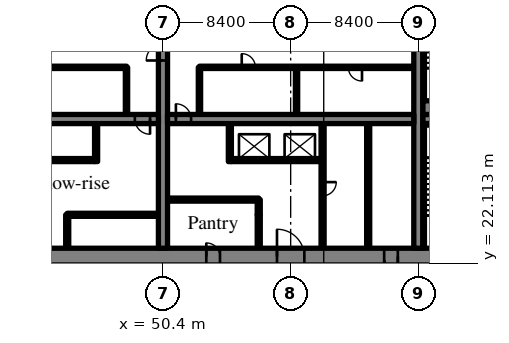
"""IFC4 building model, lengths in metres.
Left out: names, types, materials, properties, quantities, classifications, styles, units other than length and angle.
Written with IfcOpenShell. Run it as: python <this file> out.ifc"""

import sys

from ifc_helpers import new_model, si_unit, direction, frame, frame_2d, origin, place, context, subcontext, project, spatial, rectangle, extrude, source, transform, mapped, element, fill, save


model = new_model("IFC4")
c1 = context("Model", 3, precision=1e-05, world=origin(), true_north=direction((0.0, 1.0)))
c2 = subcontext(c1, "Body", "Model", "MODEL_VIEW")
j1 = project(units=[si_unit("LENGTHUNIT", "METRE"), si_unit("PLANEANGLEUNIT", "RADIAN")], contexts=[c1])
p1 = place(None, origin())
s1 = spatial("IfcSite", under=j1, at=p1, CompositionType="ELEMENT")
p2 = place(p1, origin())
s2 = spatial("IfcBuilding", under=s1, at=p2, CompositionType="ELEMENT")
p3 = place(p2, origin())
s3 = spatial("IfcBuildingStorey", under=s2, at=p3, CompositionType="ELEMENT", Elevation=0.0)
m1 = source(origin(), c2, "Body", "SweptSolid", [
    extrude(rectangle(XDim=50.4, YDim=1.1, at=frame_2d((25.2, 0.0))), origin(), (0.0, 0.0, 1.0), 5.72),
])
p4 = place(p3, frame((25.2, 22.55, 0.0), z_axis=(0.0, 0.0, 1.0), x_axis=(1.0, 0.0, 0.0)))
e1 = element("IfcWall", 1, at=p4, inside=s3, PredefinedType="SHEAR", context=c2, shape_type="MappedRepresentation", body=[
    mapped(m1, transform((0.0, 0.0, 0.0), scale=1.0)),
])
m2 = source(origin(), c2, "Body", "SweptSolid", [
    extrude(rectangle(XDim=1.8, YDim=2.1, at=frame_2d((0.9, 1.05))), frame((0.0, 0.56, 0.0), z_axis=(0.0, -1.0, 0.0), x_axis=(1.0, 0.0, 0.0)), (0.0, 0.0, 1.0), 1.12),
])
p5 = place(p4, frame((15.9, 0.0, 0.0)))
e2 = element("IfcOpeningElement", 2, at=p5, cuts=e1, PredefinedType="OPENING", context=c2, shape_type="MappedRepresentation", body=[
    mapped(m2, transform((0.0, 0.0, 0.0), scale=1.0)),
])
p6 = place(p4, frame((32.7, 0.0, 0.0)))
e3 = element("IfcOpeningElement", 3, at=p6, cuts=e1, PredefinedType="OPENING", context=c2, shape_type="MappedRepresentation", body=[
    mapped(m2, transform((0.0, 0.0, 0.0), scale=1.0)),
])
m3 = source(origin(), c2, "Body", "SweptSolid", [
    extrude(rectangle(XDim=0.9, YDim=2.1, at=frame_2d((0.45, 1.05))), frame((0.0, 0.56, 0.0), z_axis=(0.0, -1.0, 0.0), x_axis=(1.0, 0.0, 0.0)), (0.0, 0.0, 1.0), 1.12),
])
p7 = place(p4, frame((39.75, 0.0, 0.0)))
e4 = element("IfcOpeningElement", 4, at=p7, cuts=e1, PredefinedType="OPENING", context=c2, shape_type="MappedRepresentation", body=[
    mapped(m3, transform((0.0, 0.0, 0.0), scale=1.0)),
])
p8 = place(p4, frame((28.05, 0.0, 0.0)))
e5 = element("IfcOpeningElement", 5, at=p8, cuts=e1, PredefinedType="OPENING", context=c2, shape_type="MappedRepresentation", body=[
    mapped(m3, transform((0.0, 0.0, 0.0), scale=1.0)),
])
m4 = source(origin(), c2, "Body", "SweptSolid", [
    extrude(rectangle(XDim=1.2, YDim=2.1, at=frame_2d((0.6, 1.05))), frame((0.0, 0.56, 0.0), z_axis=(0.0, -1.0, 0.0), x_axis=(1.0, 0.0, 0.0)), (0.0, 0.0, 1.0), 1.12),
])
p9 = place(p4, frame((6.425, 0.0, 0.0)))
e6 = element("IfcOpeningElement", 6, at=p9, cuts=e1, PredefinedType="OPENING", context=c2, shape_type="MappedRepresentation", body=[
    mapped(m4, transform((0.0, 0.0, 0.0), scale=1.0)),
])
p10 = place(p4, frame((47.675, 0.0, 0.0)))
e7 = element("IfcOpeningElement", 7, at=p10, cuts=e1, PredefinedType="OPENING", context=c2, shape_type="MappedRepresentation", body=[
    mapped(m4, transform((0.0, 0.0, 0.0), scale=1.0)),
])
m5 = source(origin(), c2, "Body", "SweptSolid", [
    extrude(rectangle(XDim=17.8, YDim=0.6, at=frame_2d((8.9, 0.0))), origin(), (0.0, 0.0, 1.0), 5.72),
])
p11 = place(p3, frame((50.4, 23.1, 0.0), z_axis=(0.0, 0.0, 1.0), x_axis=(0.0, 1.0, 0.0)))
e8 = element("IfcWall", 8, at=p11, inside=s3, PredefinedType="SHEAR", context=c2, shape_type="MappedRepresentation", body=[
    mapped(m5, transform((0.0, 0.0, 0.0), scale=1.0)),
])
m6 = source(origin(), c2, "Body", "SweptSolid", [
    extrude(rectangle(XDim=1.1, YDim=2.1, at=frame_2d((0.55, 1.05))), frame((0.0, 0.31, 0.0), z_axis=(0.0, -1.0, 0.0), x_axis=(1.0, 0.0, 0.0)), (0.0, 0.0, 1.0), 0.62),
])
p12 = place(p11, frame((12.35, 0.0, 0.0)))
e9 = element("IfcOpeningElement", 9, at=p12, cuts=e8, PredefinedType="OPENING", context=c2, shape_type="MappedRepresentation", body=[
    mapped(m6, transform((0.0, 0.0, 0.0), scale=1.0)),
])
p13 = place(p3, frame((67.2, 23.1, 0.0), z_axis=(0.0, 0.0, 1.0), x_axis=(0.0, 1.0, 0.0)))
e10 = element("IfcWall", 10, at=p13, inside=s3, PredefinedType="SHEAR", context=c2, shape_type="MappedRepresentation", body=[
    mapped(m5, transform((0.0, 0.0, 0.0), scale=1.0)),
])
m7 = source(origin(), c2, "Body", "SweptSolid", [
    extrude(rectangle(XDim=16.2, YDim=0.6, at=frame_2d((8.1, 0.0))), origin(), (0.0, 0.0, 1.0), 5.72),
])
p14 = place(p3, frame((33.9, 31.6, 0.0), z_axis=(0.0, 0.0, 1.0), x_axis=(1.0, 0.0, 0.0)))
e11 = element("IfcWall", 11, at=p14, inside=s3, PredefinedType="SHEAR", context=c2, shape_type="MappedRepresentation", body=[
    mapped(m7, transform((0.0, 0.0, 0.0), scale=1.0)),
])
m8 = source(origin(), c2, "Body", "SweptSolid", [
    extrude(rectangle(XDim=1.0, YDim=2.1, at=frame_2d((0.5, 1.05))), frame((0.0, 0.31, 0.0), z_axis=(0.0, -1.0, 0.0), x_axis=(1.0, 0.0, 0.0)), (0.0, 0.0, 1.0), 0.62),
])
p15 = place(p14, frame((14.65, 0.0, 0.0)))
e12 = element("IfcOpeningElement", 12, at=p15, cuts=e11, PredefinedType="OPENING", context=c2, shape_type="MappedRepresentation", body=[
    mapped(m8, transform((0.0, 0.0, 0.0), scale=1.0)),
])
m9 = source(origin(), c2, "Body", "SweptSolid", [
    extrude(rectangle(XDim=16.2, YDim=0.6, at=frame_2d((8.1, 0.0))), origin(), (0.0, 0.0, 1.0), 5.72),
])
p16 = place(p3, frame((50.7, 31.6, 0.0), z_axis=(0.0, 0.0, 1.0), x_axis=(1.0, 0.0, 0.0)))
e13 = element("IfcWall", 13, at=p16, inside=s3, PredefinedType="SHEAR", context=c2, shape_type="MappedRepresentation", body=[
    mapped(m9, transform((0.0, 0.0, 0.0), scale=1.0)),
])
p17 = place(p16, frame((0.55, 0.0, 0.0)))
e14 = element("IfcOpeningElement", 14, at=p17, cuts=e13, PredefinedType="OPENING", context=c2, shape_type="MappedRepresentation", body=[
    mapped(m8, transform((0.0, 0.0, 0.0), scale=1.0)),
])
m10 = source(origin(), c2, "Body", "SweptSolid", [
    extrude(rectangle(XDim=7.0, YDim=0.6, at=frame_2d((3.5, 0.0))), origin(), (0.0, 0.0, 1.0), 5.72),
])
p18 = place(p3, frame((67.5, 31.6, 0.0), z_axis=(0.0, 0.0, 1.0), x_axis=(1.0, 0.0, 0.0)))
e15 = element("IfcWall", 15, at=p18, inside=s3, PredefinedType="SHEAR", context=c2, shape_type="MappedRepresentation", body=[
    mapped(m10, transform((0.0, 0.0, 0.0), scale=1.0)),
])
p19 = place(p18, frame((5.425, 0.0, 0.0)))
e16 = element("IfcOpeningElement", 16, at=p19, cuts=e15, PredefinedType="OPENING", context=c2, shape_type="MappedRepresentation", body=[
    mapped(m6, transform((0.0, 0.0, 0.0), scale=1.0)),
])
m11 = source(origin(), c2, "Body", "SweptSolid", [
    extrude(rectangle(XDim=6.0, YDim=0.2, at=frame_2d((3.0, 0.0))), origin(), (0.0, 0.0, 1.0), 5.72),
])
p20 = place(p3, frame((44.1, 25.3, 0.0), z_axis=(0.0, 0.0, 1.0), x_axis=(1.0, 0.0, 0.0)))
e17 = element("IfcWall", 17, at=p20, inside=s3, PredefinedType="SOLIDWALL", context=c2, shape_type="MappedRepresentation", body=[
    mapped(m11, transform((0.0, 0.0, 0.0), scale=1.0)),
])
m12 = source(origin(), c2, "Body", "SweptSolid", [
    extrude(rectangle(XDim=1.1, YDim=2.1, at=frame_2d((0.55, 1.05))), frame((0.0, 0.11, 0.0), z_axis=(0.0, -1.0, 0.0), x_axis=(1.0, 0.0, 0.0)), (0.0, 0.0, 1.0), 0.22),
])
p21 = place(p20, frame((0.95, 0.0, 0.0)))
e18 = element("IfcOpeningElement", 18, at=p21, cuts=e17, PredefinedType="OPENING", context=c2, shape_type="MappedRepresentation", body=[
    mapped(m12, transform((0.0, 0.0, 0.0), scale=1.0)),
])
p22 = place(p20, frame((3.95, 0.0, 0.0)))
e19 = element("IfcOpeningElement", 19, at=p22, cuts=e17, PredefinedType="OPENING", context=c2, shape_type="MappedRepresentation", body=[
    mapped(m12, transform((0.0, 0.0, 0.0), scale=1.0)),
])
m13 = source(origin(), c2, "Body", "SweptSolid", [
    extrude(rectangle(XDim=12.0, YDim=0.2, at=frame_2d((6.0, 0.0))), origin(), (0.0, 0.0, 1.0), 5.72),
])
p23 = place(p3, frame((33.9, 28.9, 0.0), z_axis=(0.0, 0.0, 1.0), x_axis=(1.0, 0.0, 0.0)))
e20 = element("IfcWall", 20, at=p23, inside=s3, PredefinedType="SOLIDWALL", context=c2, shape_type="MappedRepresentation", body=[
    mapped(m13, transform((0.0, 0.0, 0.0), scale=1.0)),
])
p24 = place(p23, frame((0.95, 0.0, 0.0)))
e21 = element("IfcOpeningElement", 21, at=p24, cuts=e20, PredefinedType="OPENING", context=c2, shape_type="MappedRepresentation", body=[
    mapped(m12, transform((0.0, 0.0, 0.0), scale=1.0)),
])
p25 = place(p23, frame((3.95, 0.0, 0.0)))
e22 = element("IfcOpeningElement", 22, at=p25, cuts=e20, PredefinedType="OPENING", context=c2, shape_type="MappedRepresentation", body=[
    mapped(m12, transform((0.0, 0.0, 0.0), scale=1.0)),
])
p26 = place(p23, frame((6.95, 0.0, 0.0)))
e23 = element("IfcOpeningElement", 23, at=p26, cuts=e20, PredefinedType="OPENING", context=c2, shape_type="MappedRepresentation", body=[
    mapped(m12, transform((0.0, 0.0, 0.0), scale=1.0)),
])
p27 = place(p23, frame((9.95, 0.0, 0.0)))
e24 = element("IfcOpeningElement", 24, at=p27, cuts=e20, PredefinedType="OPENING", context=c2, shape_type="MappedRepresentation", body=[
    mapped(m12, transform((0.0, 0.0, 0.0), scale=1.0)),
])
m14 = source(origin(), c2, "Body", "SweptSolid", [
    extrude(rectangle(XDim=2.2, YDim=0.2, at=frame_2d((1.1, 0.0))), origin(), (0.0, 0.0, 1.0), 5.72),
])
p28 = place(p3, frame((44.1, 23.1, 0.0), z_axis=(0.0, 0.0, 1.0), x_axis=(0.0, 1.0, 0.0)))
e25 = element("IfcWall", 25, at=p28, inside=s3, PredefinedType="SOLIDWALL", context=c2, shape_type="MappedRepresentation", body=[
    mapped(m14, transform((0.0, 0.0, 0.0), scale=1.0)),
])
m15 = source(origin(), c2, "Body", "SweptSolid", [
    extrude(rectangle(XDim=2.5, YDim=0.2, at=frame_2d((1.25, 0.0))), origin(), (0.0, 0.0, 1.0), 5.72),
])
p29 = place(p3, frame((46.0, 28.8, 0.0), z_axis=(0.0, 0.0, 1.0), x_axis=(0.0, 1.0, 0.0)))
e26 = element("IfcWall", 26, at=p29, inside=s3, PredefinedType="SOLIDWALL", context=c2, shape_type="MappedRepresentation", body=[
    mapped(m15, transform((0.0, 0.0, 0.0), scale=1.0)),
])
m16 = source(origin(), c2, "Body", "SweptSolid", [
    extrude(rectangle(XDim=3.1, YDim=0.15, at=frame_2d((1.55, 0.0))), origin(), (0.0, 0.0, 1.0), 5.72),
])
p30 = place(p3, frame((48.0, 31.9, 0.0), z_axis=(0.0, 0.0, 1.0), x_axis=(0.0, 1.0, 0.0)))
e27 = element("IfcWall", 27, at=p30, inside=s3, PredefinedType="PARTITIONING", context=c2, shape_type="MappedRepresentation", body=[
    mapped(m16, transform((0.0, 0.0, 0.0), scale=1.0)),
])
m17 = source(origin(), c2, "Body", "SweptSolid", [
    extrude(rectangle(XDim=14.1, YDim=0.15, at=frame_2d((7.05, 0.0))), origin(), (0.0, 0.0, 1.0), 5.72),
])
p31 = place(p3, frame((33.9, 35.0, 0.0), z_axis=(0.0, 0.0, 1.0), x_axis=(1.0, 0.0, 0.0)))
e28 = element("IfcWall", 28, at=p31, inside=s3, PredefinedType="PARTITIONING", context=c2, shape_type="MappedRepresentation", body=[
    mapped(m17, transform((0.0, 0.0, 0.0), scale=1.0)),
])
m18 = source(origin(), c2, "Body", "SweptSolid", [
    extrude(rectangle(XDim=0.9, YDim=2.1, at=frame_2d((0.45, 1.05))), frame((0.0, 0.085, 0.0), z_axis=(0.0, -1.0, 0.0), x_axis=(1.0, 0.0, 0.0)), (0.0, 0.0, 1.0), 0.17),
])
p32 = place(p31, frame((6.562, 0.0, 0.0)))
e29 = element("IfcOpeningElement", 29, at=p32, cuts=e28, PredefinedType="OPENING", context=c2, shape_type="MappedRepresentation", body=[
    mapped(m18, transform((0.0, 0.0, 0.0), scale=1.0)),
])
p33 = place(p3, frame((60.9, 28.9, 0.0), z_axis=(0.0, 0.0, 1.0), x_axis=(-1.0, 0.0, 0.0)))
e30 = element("IfcWall", 30, at=p33, inside=s3, PredefinedType="SOLIDWALL", context=c2, shape_type="MappedRepresentation", body=[
    mapped(m11, transform((0.0, 0.0, 0.0), scale=1.0)),
])
p34 = place(p33, frame((0.95, 0.0, 0.0)))
e31 = element("IfcOpeningElement", 31, at=p34, cuts=e30, PredefinedType="OPENING", context=c2, shape_type="MappedRepresentation", body=[
    mapped(m12, transform((0.0, 0.0, 0.0), scale=1.0)),
])
p35 = place(p33, frame((3.95, 0.0, 0.0)))
e32 = element("IfcOpeningElement", 32, at=p35, cuts=e30, PredefinedType="OPENING", context=c2, shape_type="MappedRepresentation", body=[
    mapped(m12, transform((0.0, 0.0, 0.0), scale=1.0)),
])
m19 = source(origin(), c2, "Body", "SweptSolid", [
    extrude(rectangle(XDim=8.2, YDim=0.2, at=frame_2d((4.1, 0.0))), origin(), (0.0, 0.0, 1.0), 5.72),
])
p36 = place(p3, frame((60.9, 23.1, 0.0), z_axis=(0.0, 0.0, 1.0), x_axis=(0.0, 1.0, 0.0)))
e33 = element("IfcWall", 33, at=p36, inside=s3, PredefinedType="PARTITIONING", context=c2, shape_type="MappedRepresentation", body=[
    mapped(m19, transform((0.0, 0.0, 0.0), scale=1.0)),
])
m20 = source(origin(), c2, "Body", "SweptSolid", [
    extrude(rectangle(XDim=0.9, YDim=2.1, at=frame_2d((0.45, 1.05))), frame((0.0, 0.11, 0.0), z_axis=(0.0, -1.0, 0.0), x_axis=(1.0, 0.0, 0.0)), (0.0, 0.0, 1.0), 0.22),
])
p37 = place(p36, frame((3.45, 0.0, 0.0)))
e34 = element("IfcOpeningElement", 34, at=p37, cuts=e33, PredefinedType="OPENING", context=c2, shape_type="MappedRepresentation", body=[
    mapped(m20, transform((0.0, 0.0, 0.0), scale=1.0)),
])
p38 = place(p3, frame((56.7, 23.1, 0.0), z_axis=(0.0, 0.0, 1.0), x_axis=(0.0, 1.0, 0.0)))
e35 = element("IfcWall", 35, at=p38, inside=s3, PredefinedType="PARTITIONING", context=c2, shape_type="MappedRepresentation", body=[
    mapped(m14, transform((0.0, 0.0, 0.0), scale=1.0)),
])
p39 = place(p3, frame((54.8, 28.8, 0.0), z_axis=(0.0, 0.0, 1.0), x_axis=(0.0, 1.0, 0.0)))
e36 = element("IfcWall", 36, at=p39, inside=s3, PredefinedType="SOLIDWALL", context=c2, shape_type="MappedRepresentation", body=[
    mapped(m15, transform((0.0, 0.0, 0.0), scale=1.0)),
])
p40 = place(p3, frame((63.9, 23.1, 0.0), z_axis=(0.0, 0.0, 1.0), x_axis=(0.0, 1.0, 0.0)))
e37 = element("IfcWall", 37, at=p40, inside=s3, PredefinedType="PARTITIONING", context=c2, shape_type="MappedRepresentation", body=[
    mapped(m19, transform((0.0, 0.0, 0.0), scale=1.0)),
])
p41 = place(p3, frame((56.7, 26.3, 0.0), z_axis=(0.0, 0.0, 1.0), x_axis=(-1.0, 0.0, 0.0)))
e38 = element("IfcWall", 38, at=p41, inside=s3, PredefinedType="PARTITIONING", context=c2, shape_type="MappedRepresentation", body=[
    mapped(m11, transform((0.0, 0.0, 0.0), scale=1.0)),
])
m21 = source(origin(), c2, "Body", "SweptSolid", [
    extrude(rectangle(XDim=1.0, YDim=0.2, at=frame_2d((0.5, 0.0))), origin(), (0.0, 0.0, 1.0), 5.72),
])
p42 = place(p3, frame((56.7, 25.3, 0.0), z_axis=(0.0, 0.0, 1.0), x_axis=(0.0, 1.0, 0.0)))
e39 = element("IfcWall", 39, at=p42, inside=s3, PredefinedType="PARTITIONING", context=c2, shape_type="MappedRepresentation", body=[
    mapped(m21, transform((0.0, 0.0, 0.0), scale=1.0)),
])
p43 = place(p3, frame((52.8, 31.9, 0.0), z_axis=(0.0, 0.0, 1.0), x_axis=(0.0, 1.0, 0.0)))
e40 = element("IfcWall", 40, at=p43, inside=s3, PredefinedType="PARTITIONING", context=c2, shape_type="MappedRepresentation", body=[
    mapped(m16, transform((0.0, 0.0, 0.0), scale=1.0)),
])
m22 = source(origin(), c2, "Body", "SweptSolid", [
    extrude(rectangle(XDim=14.1, YDim=0.15, at=frame_2d((7.05, 0.0))), origin(), (0.0, 0.0, 1.0), 5.72),
])
p44 = place(p3, frame((66.9, 35.0, 0.0), z_axis=(0.0, 0.0, 1.0), x_axis=(-1.0, 0.0, 0.0)))
e41 = element("IfcWall", 41, at=p44, inside=s3, PredefinedType="PARTITIONING", context=c2, shape_type="MappedRepresentation", body=[
    mapped(m22, transform((0.0, 0.0, 0.0), scale=1.0)),
])
p45 = place(p44, frame((3.407, 0.0, 0.0)))
e42 = element("IfcOpeningElement", 42, at=p45, cuts=e41, PredefinedType="OPENING", context=c2, shape_type="MappedRepresentation", body=[
    mapped(m18, transform((0.0, 0.0, 0.0), scale=1.0)),
])
p46 = place(p44, frame((10.419, 0.0, 0.0)))
e43 = element("IfcOpeningElement", 43, at=p46, cuts=e41, PredefinedType="OPENING", context=c2, shape_type="MappedRepresentation", body=[
    mapped(m18, transform((0.0, 0.0, 0.0), scale=1.0)),
])
p47 = place(p3, frame((59.186, 31.9, 0.0), z_axis=(0.0, 0.0, 1.0), x_axis=(0.0, 1.0, 0.0)))
e44 = element("IfcWall", 44, at=p47, inside=s3, PredefinedType="PARTITIONING", context=c2, shape_type="MappedRepresentation", body=[
    mapped(m16, transform((0.0, 0.0, 0.0), scale=1.0)),
])
m23 = source(origin(), c2, "Body", "SweptSolid", [
    extrude(rectangle(XDim=4.75, YDim=0.1, at=frame_2d((2.375, 0.0))), origin(), (0.0, 0.0, 1.0), 5.72),
])
p48 = place(p3, frame((67.5, 31.25, 0.0), z_axis=(0.0, 0.0, 1.0), x_axis=(1.0, 0.0, 0.0)))
e45 = element("IfcWall", 45, at=p48, inside=s3, PredefinedType="SOLIDWALL", context=c2, shape_type="MappedRepresentation", body=[
    mapped(m23, transform((0.0, 0.0, 0.0), scale=1.0)),
])
m24 = source(origin(), c2, "Body", "SweptSolid", [
    extrude(rectangle(XDim=8.1, YDim=0.1, at=frame_2d((4.05, 0.0))), origin(), (0.0, 0.0, 1.0), 5.72),
])
p49 = place(p3, frame((67.55, 23.1, 0.0), z_axis=(0.0, 0.0, 1.0), x_axis=(0.0, 1.0, 0.0)))
e46 = element("IfcWall", 46, at=p49, inside=s3, PredefinedType="SOLIDWALL", context=c2, shape_type="MappedRepresentation", body=[
    mapped(m24, transform((0.0, 0.0, 0.0), scale=1.0)),
])
m25 = source(origin(), c2, "Body", "SweptSolid", [
    extrude(rectangle(XDim=4.75, YDim=0.9, at=frame_2d((2.375, 0.0))), origin(), (0.0, 0.0, 1.0), 5.72),
])
p50 = place(p3, frame((67.5, 32.35, 0.0), z_axis=(0.0, 0.0, 1.0), x_axis=(1.0, 0.0, 0.0)))
e47 = element("IfcWall", 47, at=p50, inside=s3, PredefinedType="SOLIDWALL", context=c2, shape_type="MappedRepresentation", body=[
    mapped(m25, transform((0.0, 0.0, 0.0), scale=1.0)),
])
p51 = place(p3, frame((67.55, 32.8, 0.0), z_axis=(0.0, 0.0, 1.0), x_axis=(0.0, 1.0, 0.0)))
e48 = element("IfcWall", 48, at=p51, inside=s3, PredefinedType="SOLIDWALL", context=c2, shape_type="MappedRepresentation", body=[
    mapped(m24, transform((0.0, 0.0, 0.0), scale=1.0)),
])
m26 = source(origin(), c2, "Body", "SweptSolid", [
    extrude(rectangle(XDim=1.0, YDim=2.1, at=frame_2d((0.5, 1.05))), frame((0.0, 0.025, 0.0), z_axis=(0.0, -1.0, 0.0), x_axis=(1.0, 0.0, 0.0)), (0.0, 0.0, 1.0), 0.05),
])
p52 = place(p15, origin())
e49 = element("IfcDoor", 49, at=p52, inside=s3, OperationType="SINGLE_SWING_RIGHT", PredefinedType="DOOR", context=c2, shape_type="MappedRepresentation", body=[
    mapped(m26, transform((0.0, 0.0, 0.0), scale=1.0)),
])
fill(e12, e49)
m27 = source(origin(), c2, "Body", "SweptSolid", [
    extrude(rectangle(XDim=1.1, YDim=2.1, at=frame_2d((0.55, 1.05))), frame((0.0, 0.025, 0.0), z_axis=(0.0, -1.0, 0.0), x_axis=(1.0, 0.0, 0.0)), (0.0, 0.0, 1.0), 0.05),
])
p53 = place(p21, origin())
e50 = element("IfcDoor", 50, at=p53, inside=s3, OperationType="SLIDING_TO_LEFT", PredefinedType="DOOR", context=c2, shape_type="MappedRepresentation", body=[
    mapped(m27, transform((0.0, 0.0, 0.0), scale=1.0)),
])
fill(e18, e50)
p54 = place(p22, origin())
e51 = element("IfcDoor", 51, at=p54, inside=s3, OperationType="SLIDING_TO_RIGHT", PredefinedType="DOOR", context=c2, shape_type="MappedRepresentation", body=[
    mapped(m27, transform((0.0, 0.0, 0.0), scale=1.0)),
])
fill(e19, e51)
p55 = place(p27, origin())
e52 = element("IfcDoor", 52, at=p55, inside=s3, OperationType="SLIDING_TO_RIGHT", PredefinedType="DOOR", context=c2, shape_type="MappedRepresentation", body=[
    mapped(m27, transform((0.0, 0.0, 0.0), scale=1.0)),
])
fill(e24, e52)
m28 = source(origin(), c2, "Body", "SweptSolid", [
    extrude(rectangle(XDim=1.8, YDim=2.1, at=frame_2d((0.9, 1.05))), frame((0.0, 0.325, 0.0), z_axis=(0.0, -1.0, 0.0), x_axis=(1.0, 0.0, 0.0)), (0.0, 0.0, 1.0), 0.05),
])
p56 = place(p6, origin())
e53 = element("IfcDoor", 53, at=p56, inside=s3, OperationType="DOUBLE_DOOR_SINGLE_SWING", PredefinedType="DOOR", context=c2, shape_type="MappedRepresentation", body=[
    mapped(m28, transform((0.0, 0.0, 0.0), scale=1.0)),
])
fill(e3, e53)
p57 = place(p17, origin())
e54 = element("IfcDoor", 54, at=p57, inside=s3, OperationType="SINGLE_SWING_LEFT", PredefinedType="DOOR", context=c2, shape_type="MappedRepresentation", body=[
    mapped(m26, transform((0.0, 0.0, 0.0), scale=1.0)),
])
fill(e14, e54)
p58 = place(p34, origin())
e55 = element("IfcDoor", 55, at=p58, inside=s3, OperationType="SLIDING_TO_RIGHT", PredefinedType="DOOR", context=c2, shape_type="MappedRepresentation", body=[
    mapped(m27, transform((0.0, 0.0, 0.0), scale=1.0)),
])
fill(e31, e55)
p59 = place(p35, origin())
e56 = element("IfcDoor", 56, at=p59, inside=s3, OperationType="SLIDING_TO_LEFT", PredefinedType="DOOR", context=c2, shape_type="MappedRepresentation", body=[
    mapped(m27, transform((0.0, 0.0, 0.0), scale=1.0)),
])
fill(e32, e56)
m29 = source(origin(), c2, "Body", "SweptSolid", [
    extrude(rectangle(XDim=0.9, YDim=2.1, at=frame_2d((0.45, 1.05))), frame((0.0, 0.325, 0.0), z_axis=(0.0, -1.0, 0.0), x_axis=(1.0, 0.0, 0.0)), (0.0, 0.0, 1.0), 0.05),
])
p60 = place(p7, origin())
e57 = element("IfcDoor", 57, at=p60, inside=s3, OperationType="SINGLE_SWING_RIGHT", PredefinedType="DOOR", context=c2, shape_type="MappedRepresentation", body=[
    mapped(m29, transform((0.0, 0.0, 0.0), scale=1.0)),
])
fill(e4, e57)
m30 = source(origin(), c2, "Body", "SweptSolid", [
    extrude(rectangle(XDim=0.9, YDim=2.1, at=frame_2d((0.45, 1.05))), frame((0.0, 0.025, 0.0), z_axis=(0.0, -1.0, 0.0), x_axis=(1.0, 0.0, 0.0)), (0.0, 0.0, 1.0), 0.05),
])
p61 = place(p37, origin())
e58 = element("IfcDoor", 58, at=p61, inside=s3, OperationType="SINGLE_SWING_RIGHT", PredefinedType="DOOR", context=c2, shape_type="MappedRepresentation", body=[
    mapped(m30, transform((0.0, 0.0, 0.0), scale=1.0)),
])
fill(e34, e58)
p62 = place(p8, origin())
e59 = element("IfcDoor", 59, at=p62, inside=s3, OperationType="SINGLE_SWING_LEFT", PredefinedType="DOOR", context=c2, shape_type="MappedRepresentation", body=[
    mapped(m29, transform((0.0, 0.0, 0.0), scale=1.0)),
])
fill(e5, e59)
p63 = place(p45, origin())
e60 = element("IfcDoor", 60, at=p63, inside=s3, OperationType="SINGLE_SWING_LEFT", PredefinedType="DOOR", context=c2, shape_type="MappedRepresentation", body=[
    mapped(m30, transform((0.0, 0.0, 0.0), scale=1.0)),
])
fill(e42, e60)
p64 = place(p46, origin())
e61 = element("IfcDoor", 61, at=p64, inside=s3, OperationType="SINGLE_SWING_RIGHT", PredefinedType="DOOR", context=c2, shape_type="MappedRepresentation", body=[
    mapped(m30, transform((0.0, 0.0, 0.0), scale=1.0)),
])
fill(e43, e61)
p65 = place(p12, origin())
e62 = element("IfcDoor", 62, at=p65, inside=s3, OperationType="SINGLE_SWING_LEFT", PredefinedType="DOOR", context=c2, shape_type="MappedRepresentation", body=[
    mapped(m27, transform((0.0, 0.0, 0.0), scale=1.0)),
])
fill(e9, e62)
save(model, sys.argv[1])
